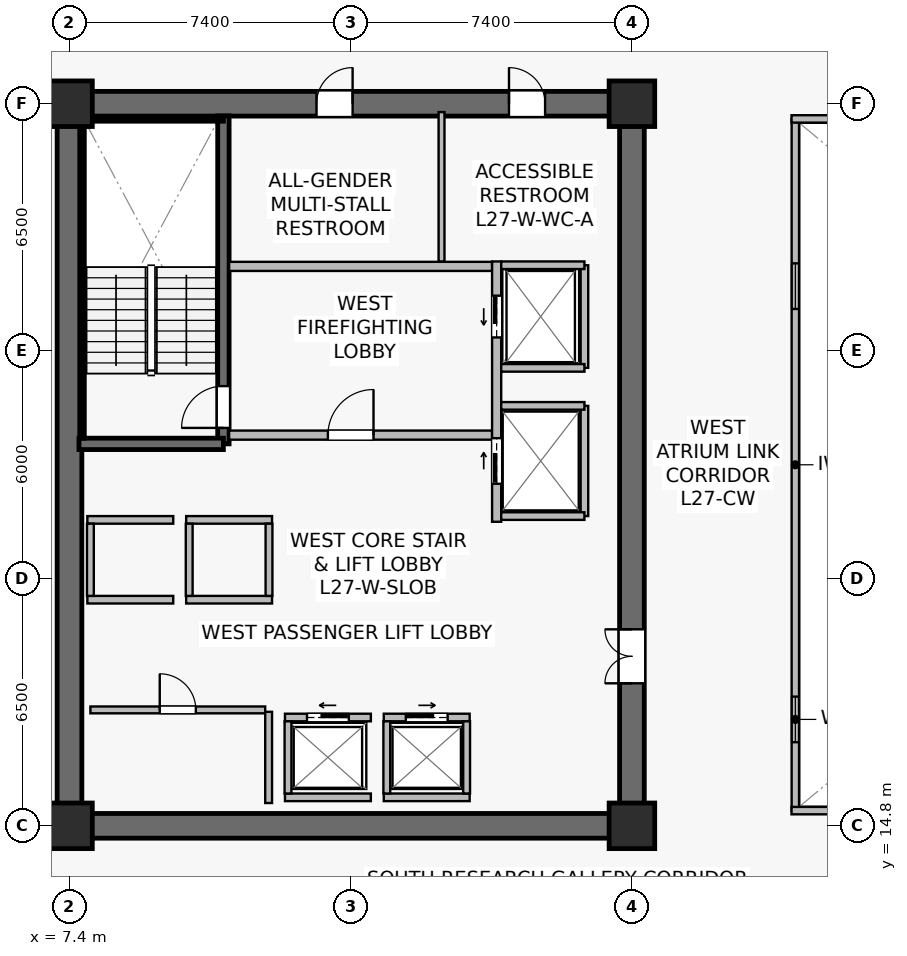
"""IFC4 building model, lengths in metres.
Left out: names, types, materials, properties, quantities, classifications, styles, units other than length and angle.
Written with IfcOpenShell. Run it as: python <this file> out.ifc"""

import sys

from ifc_helpers import new_model, si_unit, direction, frame, frame_2d, origin, origin_2d, place, context, subcontext, project, spatial, rectangle, extrude, source, transform, mapped, element, fill, save


model = new_model("IFC4")
c1 = context("Model", 3, precision=1e-05, world=origin(), true_north=direction((0.0, 1.0)))
c2 = subcontext(c1, "Body", "Model", "MODEL_VIEW")
j1 = project(units=[si_unit("LENGTHUNIT", "METRE"), si_unit("PLANEANGLEUNIT", "RADIAN")], contexts=[c1])
p1 = place(None, origin())
s1 = spatial("IfcSite", under=j1, at=p1, CompositionType="ELEMENT")
p2 = place(p1, origin())
s2 = spatial("IfcBuilding", under=s1, at=p2, CompositionType="ELEMENT")
p3 = place(p2, frame((0.0, 0.0, 113.3)))
s3 = spatial("IfcBuildingStorey", under=s2, at=p3, CompositionType="ELEMENT", Elevation=113.3)
p4 = place(p3, frame((7.075, 14.8, 0.0), z_axis=(0.0, 0.0, 1.0), x_axis=(1.0, 0.0, 0.0)))
e1 = element("IfcWall", 1, at=p4, inside=s3, PredefinedType="SHEAR", context=c2, shape_type="SweptSolid", body=[
    extrude(rectangle(XDim=15.45, YDim=0.65, at=frame_2d((7.725, 0.0))), origin(), (0.0, 0.0, 1.0), 3.79),
])
p5 = place(p3, frame((7.075, 33.8, 0.0), z_axis=(0.0, 0.0, 1.0), x_axis=(1.0, 0.0, 0.0)))
e2 = element("IfcWall", 2, at=p5, inside=s3, PredefinedType="SHEAR", context=c2, shape_type="SweptSolid", body=[
    extrude(rectangle(XDim=15.45, YDim=0.65, at=frame_2d((7.725, 0.0))), origin(), (0.0, 0.0, 1.0), 3.79),
])
p6 = place(p5, frame((6.825, 0.0, 0.0)))
e3 = element("IfcOpeningElement", 3, at=p6, cuts=e2, PredefinedType="OPENING", context=c2, shape_type="SweptSolid", body=[
    extrude(rectangle(XDim=0.95, YDim=2.15, at=frame_2d((0.475, 1.075))), frame((0.0, 0.335, 0.0), z_axis=(0.0, -1.0, 0.0), x_axis=(1.0, 0.0, 0.0)), (0.0, 0.0, 1.0), 0.67),
])
p7 = place(p5, frame((11.89, 0.0, 0.0)))
e4 = element("IfcOpeningElement", 4, at=p7, cuts=e2, PredefinedType="OPENING", context=c2, shape_type="SweptSolid", body=[
    extrude(rectangle(XDim=0.95, YDim=2.15, at=frame_2d((0.475, 1.075))), frame((0.0, 0.335, 0.0), z_axis=(0.0, -1.0, 0.0), x_axis=(1.0, 0.0, 0.0)), (0.0, 0.0, 1.0), 0.67),
])
p8 = place(p3, frame((7.4, 15.125, 0.0), z_axis=(0.0, 0.0, 1.0), x_axis=(0.0, 1.0, 0.0)))
e5 = element("IfcWall", 5, at=p8, inside=s3, PredefinedType="SHEAR", context=c2, shape_type="SweptSolid", body=[
    extrude(rectangle(XDim=18.35, YDim=0.65, at=frame_2d((9.175, 0.0))), origin(), (0.0, 0.0, 1.0), 3.79),
])
p9 = place(p3, frame((22.2, 15.125, 0.0), z_axis=(0.0, 0.0, 1.0), x_axis=(0.0, 1.0, 0.0)))
e6 = element("IfcWall", 6, at=p9, inside=s3, PredefinedType="SHEAR", context=c2, shape_type="SweptSolid", body=[
    extrude(rectangle(XDim=18.35, YDim=0.65, at=frame_2d((9.175, 0.0))), origin(), (0.0, 0.0, 1.0), 3.79),
])
p10 = place(p9, frame((3.425, 0.0, 0.0)))
e7 = element("IfcOpeningElement", 7, at=p10, cuts=e6, PredefinedType="OPENING", context=c2, shape_type="SweptSolid", body=[
    extrude(rectangle(XDim=1.42, YDim=2.2, at=frame_2d((0.71, 1.1))), frame((0.0, 0.335, 0.0), z_axis=(0.0, -1.0, 0.0), x_axis=(1.0, 0.0, 0.0)), (0.0, 0.0, 1.0), 0.67),
])
p11 = place(p3, frame((11.45, 24.85, 0.0), z_axis=(0.0, 0.0, 1.0), x_axis=(0.0, 1.0, 0.0)))
e8 = element("IfcWall", 8, at=p11, inside=s3, PredefinedType="SHEAR", context=c2, shape_type="SweptSolid", body=[
    extrude(rectangle(XDim=8.63, YDim=0.3, at=frame_2d((4.315, 0.0))), origin(), (0.0, 0.0, 1.0), 3.79),
])
p12 = place(p11, frame((0.42, 0.0, 0.0)))
e9 = element("IfcOpeningElement", 9, at=p12, cuts=e8, PredefinedType="OPENING", context=c2, shape_type="SweptSolid", body=[
    extrude(rectangle(XDim=1.1, YDim=2.15, at=frame_2d((0.55, 1.075))), frame((0.0, 0.16, 0.0), z_axis=(0.0, -1.0, 0.0), x_axis=(1.0, 0.0, 0.0)), (0.0, 0.0, 1.0), 0.32),
])
p13 = place(p3, frame((7.65, 24.85, 0.0), z_axis=(0.0, 0.0, 1.0), x_axis=(1.0, 0.0, 0.0)))
e10 = element("IfcWall", 10, at=p13, inside=s3, PredefinedType="SHEAR", context=c2, shape_type="SweptSolid", body=[
    extrude(rectangle(XDim=3.8, YDim=0.3, at=frame_2d((1.9, 0.0))), origin(), (0.0, 0.0, 1.0), 3.79),
])
p14 = place(p3, frame((7.73, 33.4, 0.0), z_axis=(0.0, 0.0, 1.0), x_axis=(1.0, 0.0, 0.0)))
e11 = element("IfcWall", 11, at=p14, inside=s3, PredefinedType="SOLIDWALL", context=c2, shape_type="SweptSolid", body=[
    extrude(rectangle(XDim=3.72, YDim=0.12, at=frame_2d((1.86, 0.0))), origin(), (0.0, 0.0, 1.0), 3.79),
])
p15 = place(p3, frame((7.73, 25.0, 0.0), z_axis=(0.0, 0.0, 1.0), x_axis=(0.0, 1.0, 0.0)))
e12 = element("IfcWall", 12, at=p15, inside=s3, PredefinedType="SOLIDWALL", context=c2, shape_type="SweptSolid", body=[
    extrude(rectangle(XDim=8.32, YDim=0.12, at=frame_2d((4.16, 0.0))), origin(), (0.0, 0.0, 1.0), 3.79),
])
m1 = source(origin(), c2, "Body", "SweptSolid", [
    extrude(rectangle(XDim=1.2, YDim=1.2, at=origin_2d()), origin(), (0.0, 0.0, 1.0), 4.1),
])
for number, where, z_axis, x_axis in (
    (13, (7.4, 14.8, 0.0), (0.0, 0.0, 1.0), (1.0, 0.0, 0.0)),
    (14, (22.2, 14.8, 0.0), (0.0, 0.0, 1.0), (1.0, 0.0, 0.0)),
    (15, (7.4, 33.8, 0.0), (0.0, 0.0, 1.0), (1.0, 0.0, 0.0)),
    (16, (22.2, 33.8, 0.0), (0.0, 0.0, 1.0), (1.0, 0.0, 0.0)),
):
    element("IfcColumn", number, at=place(p3, frame(where, z_axis=z_axis, x_axis=x_axis)), inside=s3, PredefinedType="COLUMN", context=c2, shape_type="MappedRepresentation", body=[
        mapped(m1, transform((0.0, 0.0, 0.0), scale=1.0)),
    ])
p16 = place(p3, frame((11.6, 25.08, 0.0), z_axis=(0.0, 0.0, 1.0), x_axis=(1.0, 0.0, 0.0)))
e17 = element("IfcWall", 17, at=p16, inside=s3, PredefinedType="SOLIDWALL", context=c2, shape_type="SweptSolid", body=[
    extrude(rectangle(XDim=6.92, YDim=0.24, at=frame_2d((3.46, 0.0))), origin(), (0.0, 0.0, 1.0), 3.125),
])
p17 = place(p16, frame((2.6, 0.0, 0.0)))
e18 = element("IfcOpeningElement", 18, at=p17, cuts=e17, PredefinedType="OPENING", context=c2, shape_type="SweptSolid", body=[
    extrude(rectangle(XDim=1.2, YDim=2.16, at=frame_2d((0.6, 1.08))), frame((0.0, 0.13, 0.0), z_axis=(0.0, -1.0, 0.0), x_axis=(1.0, 0.0, 0.0)), (0.0, 0.0, 1.0), 0.26),
])
p18 = place(p3, frame((11.6, 29.52, 0.0), z_axis=(0.0, 0.0, 1.0), x_axis=(1.0, 0.0, 0.0)))
e19 = element("IfcWall", 19, at=p18, inside=s3, PredefinedType="SOLIDWALL", context=c2, shape_type="SweptSolid", body=[
    extrude(rectangle(XDim=6.92, YDim=0.24, at=frame_2d((3.46, 0.0))), origin(), (0.0, 0.0, 1.0), 3.125),
])
p19 = place(p3, frame((18.64, 22.8, 0.0), z_axis=(0.0, 0.0, 1.0), x_axis=(0.0, 1.0, 0.0)))
e20 = element("IfcWall", 20, at=p19, inside=s3, PredefinedType="SOLIDWALL", context=c2, shape_type="SweptSolid", body=[
    extrude(rectangle(XDim=6.85, YDim=0.24, at=frame_2d((3.425, 0.0))), origin(), (0.0, 0.0, 1.0), 2.875),
])
p20 = place(p19, frame((4.85, 0.0, 0.0)))
e21 = element("IfcOpeningElement", 21, at=p20, cuts=e20, PredefinedType="OPENING", context=c2, shape_type="SweptSolid", body=[
    extrude(rectangle(XDim=1.1, YDim=2.22, at=frame_2d((0.55, 1.11))), frame((0.0, 0.13, 0.0), z_axis=(0.0, -1.0, 0.0), x_axis=(1.0, 0.0, 0.0)), (0.0, 0.0, 1.0), 0.26),
])
p21 = place(p19, frame((1.0, 0.0, 0.0)))
e22 = element("IfcOpeningElement", 22, at=p21, cuts=e20, PredefinedType="OPENING", context=c2, shape_type="SweptSolid", body=[
    extrude(rectangle(XDim=1.2, YDim=2.22, at=frame_2d((0.6, 1.11))), frame((0.0, 0.13, 0.0), z_axis=(0.0, -1.0, 0.0), x_axis=(1.0, 0.0, 0.0)), (0.0, 0.0, 1.0), 0.26),
])
p22 = place(p3, frame((13.07, 17.65, 0.0), z_axis=(0.0, 0.0, 1.0), x_axis=(1.0, 0.0, 0.0)))
e23 = element("IfcWall", 23, at=p22, inside=s3, PredefinedType="SOLIDWALL", context=c2, shape_type="SweptSolid", body=[
    extrude(rectangle(XDim=2.26, YDim=0.2, at=frame_2d((1.13, 0.0))), origin(), (0.0, 0.0, 1.0), 3.125),
])
p23 = place(p22, frame((0.58, 0.0, 0.0)))
e24 = element("IfcOpeningElement", 24, at=p23, cuts=e23, PredefinedType="OPENING", context=c2, shape_type="SweptSolid", body=[
    extrude(rectangle(XDim=1.1, YDim=2.22, at=frame_2d((0.55, 1.11))), frame((0.0, 0.11, 0.0), z_axis=(0.0, -1.0, 0.0), x_axis=(1.0, 0.0, 0.0)), (0.0, 0.0, 1.0), 0.22),
])
p24 = place(p3, frame((13.07, 15.55, 0.0), z_axis=(0.0, 0.0, 1.0), x_axis=(1.0, 0.0, 0.0)))
e25 = element("IfcWall", 25, at=p24, inside=s3, PredefinedType="SOLIDWALL", context=c2, shape_type="SweptSolid", body=[
    extrude(rectangle(XDim=2.26, YDim=0.2, at=frame_2d((1.13, 0.0))), origin(), (0.0, 0.0, 1.0), 3.125),
])
p25 = place(p3, frame((13.15, 15.65, 0.0), z_axis=(0.0, 0.0, 1.0), x_axis=(0.0, 1.0, 0.0)))
e26 = element("IfcWall", 26, at=p25, inside=s3, PredefinedType="SOLIDWALL", context=c2, shape_type="SweptSolid", body=[
    extrude(rectangle(XDim=1.9, YDim=0.18, at=frame_2d((0.95, 0.0))), origin(), (0.0, 0.0, 1.0), 3.79),
])
p26 = place(p3, frame((15.67, 17.65, 0.0), z_axis=(0.0, 0.0, 1.0), x_axis=(1.0, 0.0, 0.0)))
e27 = element("IfcWall", 27, at=p26, inside=s3, PredefinedType="SOLIDWALL", context=c2, shape_type="SweptSolid", body=[
    extrude(rectangle(XDim=2.26, YDim=0.2, at=frame_2d((1.13, 0.0))), origin(), (0.0, 0.0, 1.0), 3.79),
])
p27 = place(p26, frame((0.58, 0.0, 0.0)))
e28 = element("IfcOpeningElement", 28, at=p27, cuts=e27, PredefinedType="OPENING", context=c2, shape_type="SweptSolid", body=[
    extrude(rectangle(XDim=1.1, YDim=2.22, at=frame_2d((0.55, 1.11))), frame((0.0, 0.11, 0.0), z_axis=(0.0, -1.0, 0.0), x_axis=(1.0, 0.0, 0.0)), (0.0, 0.0, 1.0), 0.22),
])
p28 = place(p3, frame((15.67, 15.55, 0.0), z_axis=(0.0, 0.0, 1.0), x_axis=(1.0, 0.0, 0.0)))
e29 = element("IfcWall", 29, at=p28, inside=s3, PredefinedType="SOLIDWALL", context=c2, shape_type="SweptSolid", body=[
    extrude(rectangle(XDim=2.26, YDim=0.2, at=frame_2d((1.13, 0.0))), origin(), (0.0, 0.0, 1.0), 3.79),
])
for number, where, z_axis, x_axis in (
    (30, (15.75, 15.65, 0.0), (0.0, 0.0, 1.0), (0.0, 1.0, 0.0)),
    (31, (17.85, 15.65, 0.0), (0.0, 0.0, 1.0), (0.0, 1.0, 0.0)),
):
    element("IfcWall", number, at=place(p3, frame(where, z_axis=z_axis, x_axis=x_axis)), inside=s3, PredefinedType="SOLIDWALL", context=c2, shape_type="SweptSolid", body=[
        extrude(rectangle(XDim=1.9, YDim=0.18, at=frame_2d((0.95, 0.0))), origin(), (0.0, 0.0, 1.0), 3.79),
    ])
for number, where, z_axis, x_axis in (
    (32, (7.87, 20.75, 0.0), (0.0, 0.0, 1.0), (1.0, 0.0, 0.0)),
    (33, (7.87, 22.85, 0.0), (0.0, 0.0, 1.0), (1.0, 0.0, 0.0)),
):
    element("IfcWall", number, at=place(p3, frame(where, z_axis=z_axis, x_axis=x_axis)), inside=s3, PredefinedType="SOLIDWALL", context=c2, shape_type="SweptSolid", body=[
        extrude(rectangle(XDim=2.26, YDim=0.2, at=frame_2d((1.13, 0.0))), origin(), (0.0, 0.0, 1.0), 3.79),
    ])
p29 = place(p3, frame((7.95, 20.85, 0.0), z_axis=(0.0, 0.0, 1.0), x_axis=(0.0, 1.0, 0.0)))
e34 = element("IfcWall", 34, at=p29, inside=s3, PredefinedType="SOLIDWALL", context=c2, shape_type="SweptSolid", body=[
    extrude(rectangle(XDim=1.9, YDim=0.18, at=frame_2d((0.95, 0.0))), origin(), (0.0, 0.0, 1.0), 3.79),
])
for number, where, z_axis, x_axis in (
    (35, (10.47, 20.75, 0.0), (0.0, 0.0, 1.0), (1.0, 0.0, 0.0)),
    (36, (10.47, 22.85, 0.0), (0.0, 0.0, 1.0), (1.0, 0.0, 0.0)),
):
    element("IfcWall", number, at=place(p3, frame(where, z_axis=z_axis, x_axis=x_axis)), inside=s3, PredefinedType="SOLIDWALL", context=c2, shape_type="SweptSolid", body=[
        extrude(rectangle(XDim=2.26, YDim=0.2, at=frame_2d((1.13, 0.0))), origin(), (0.0, 0.0, 1.0), 3.79),
    ])
for number, where, z_axis, x_axis in (
    (37, (10.55, 20.85, 0.0), (0.0, 0.0, 1.0), (0.0, 1.0, 0.0)),
    (38, (12.65, 20.85, 0.0), (0.0, 0.0, 1.0), (0.0, 1.0, 0.0)),
):
    element("IfcWall", number, at=place(p3, frame(where, z_axis=z_axis, x_axis=x_axis)), inside=s3, PredefinedType="SOLIDWALL", context=c2, shape_type="SweptSolid", body=[
        extrude(rectangle(XDim=1.9, YDim=0.18, at=frame_2d((0.95, 0.0))), origin(), (0.0, 0.0, 1.0), 3.79),
    ])
p30 = place(p3, frame((20.95, 26.85, 0.0), z_axis=(0.0, 0.0, 1.0), x_axis=(0.0, 1.0, 0.0)))
e39 = element("IfcWall", 39, at=p30, inside=s3, PredefinedType="SOLIDWALL", context=c2, shape_type="SweptSolid", body=[
    extrude(rectangle(XDim=2.7, YDim=0.2, at=frame_2d((1.35, 0.0))), origin(), (0.0, 0.0, 1.0), 3.79),
])
p31 = place(p3, frame((18.76, 29.55, 0.0), z_axis=(0.0, 0.0, 1.0), x_axis=(1.0, 0.0, 0.0)))
e40 = element("IfcWall", 40, at=p31, inside=s3, PredefinedType="SOLIDWALL", context=c2, shape_type="SweptSolid", body=[
    extrude(rectangle(XDim=2.19, YDim=0.2, at=frame_2d((1.095, 0.0))), origin(), (0.0, 0.0, 1.0), 3.79),
])
p32 = place(p3, frame((18.76, 26.85, 0.0), z_axis=(0.0, 0.0, 1.0), x_axis=(1.0, 0.0, 0.0)))
e41 = element("IfcWall", 41, at=p32, inside=s3, PredefinedType="SOLIDWALL", context=c2, shape_type="SweptSolid", body=[
    extrude(rectangle(XDim=2.19, YDim=0.2, at=frame_2d((1.095, 0.0))), origin(), (0.0, 0.0, 1.0), 3.187),
])
p33 = place(p3, frame((20.95, 22.95, 0.0), z_axis=(0.0, 0.0, 1.0), x_axis=(0.0, 1.0, 0.0)))
e42 = element("IfcWall", 42, at=p33, inside=s3, PredefinedType="SOLIDWALL", context=c2, shape_type="SweptSolid", body=[
    extrude(rectangle(XDim=2.9, YDim=0.2, at=frame_2d((1.45, 0.0))), origin(), (0.0, 0.0, 1.0), 2.875),
])
for number, where, z_axis, x_axis in (
    (43, (18.76, 25.85, 0.0), (0.0, 0.0, 1.0), (1.0, 0.0, 0.0)),
    (44, (18.76, 22.95, 0.0), (0.0, 0.0, 1.0), (1.0, 0.0, 0.0)),
):
    element("IfcWall", number, at=place(p3, frame(where, z_axis=z_axis, x_axis=x_axis)), inside=s3, PredefinedType="SOLIDWALL", context=c2, shape_type="SweptSolid", body=[
        extrude(rectangle(XDim=2.19, YDim=0.2, at=frame_2d((1.095, 0.0))), origin(), (0.0, 0.0, 1.0), 3.79),
    ])
p34 = place(p3, frame((7.95, 17.85, 0.0), z_axis=(0.0, 0.0, 1.0), x_axis=(1.0, 0.0, 0.0)))
e45 = element("IfcWall", 45, at=p34, inside=s3, PredefinedType="SOLIDWALL", context=c2, shape_type="SweptSolid", body=[
    extrude(rectangle(XDim=4.6, YDim=0.18, at=frame_2d((2.3, 0.0))), origin(), (0.0, 0.0, 1.0), 3.79),
])
p35 = place(p34, frame((1.825, 0.0, 0.0)))
e46 = element("IfcOpeningElement", 46, at=p35, cuts=e45, PredefinedType="OPENING", context=c2, shape_type="SweptSolid", body=[
    extrude(rectangle(XDim=0.95, YDim=2.15, at=frame_2d((0.475, 1.075))), frame((0.0, 0.1, 0.0), z_axis=(0.0, -1.0, 0.0), x_axis=(1.0, 0.0, 0.0)), (0.0, 0.0, 1.0), 0.2),
])
p36 = place(p3, frame((12.64, 15.4, 0.0), z_axis=(0.0, 0.0, 1.0), x_axis=(0.0, 1.0, 0.0)))
e47 = element("IfcWall", 47, at=p36, inside=s3, PredefinedType="SOLIDWALL", context=c2, shape_type="SweptSolid", body=[
    extrude(rectangle(XDim=2.4, YDim=0.18, at=frame_2d((1.2, 0.0))), origin(), (0.0, 0.0, 1.0), 3.79),
])
p37 = place(p3, frame((17.19, 29.65, 0.0), z_axis=(0.0, 0.0, 1.0), x_axis=(0.0, 1.0, 0.0)))
e48 = element("IfcWall", 48, at=p37, inside=s3, PredefinedType="PLUMBINGWALL", context=c2, shape_type="SweptSolid", body=[
    extrude(rectangle(XDim=3.93, YDim=0.155, at=frame_2d((1.965, 0.0))), origin(), (0.0, 0.0, 1.0), 3.79),
])
p38 = place(p3, frame((26.5, 15.2, 0.0), z_axis=(0.0, 0.0, 1.0), x_axis=(0.0, 1.0, 0.0)))
e49 = element("IfcWall", 49, at=p38, inside=s3, PredefinedType="SOLIDWALL", context=c2, shape_type="SweptSolid", body=[
    extrude(rectangle(XDim=18.2, YDim=0.195, at=frame_2d((9.1, 0.0))), origin(), (0.0, 0.0, 1.0), 3.79),
])
p39 = place(p38, frame((1.8, 0.0, 0.9)))
e50 = element("IfcOpeningElement", 50, at=p39, cuts=e49, PredefinedType="OPENING", context=c2, shape_type="SweptSolid", body=[
    extrude(rectangle(XDim=1.2, YDim=1.35, at=frame_2d((0.6, 0.675))), frame((0.0, 0.107, 0.0), z_axis=(0.0, -1.0, 0.0), x_axis=(1.0, 0.0, 0.0)), (0.0, 0.0, 1.0), 0.215),
])
p40 = place(p38, frame((13.2, 0.0, 0.9)))
e51 = element("IfcOpeningElement", 51, at=p40, cuts=e49, PredefinedType="OPENING", context=c2, shape_type="SweptSolid", body=[
    extrude(rectangle(XDim=1.2, YDim=1.35, at=frame_2d((0.6, 0.675))), frame((0.0, 0.107, 0.0), z_axis=(0.0, -1.0, 0.0), x_axis=(1.0, 0.0, 0.0)), (0.0, 0.0, 1.0), 0.215),
])
for number, where, z_axis, x_axis in (
    (52, (26.4, 15.2, 0.0), (0.0, 0.0, 1.0), (1.0, 0.0, 0.0)),
    (53, (26.4, 33.4, 0.0), (0.0, 0.0, 1.0), (1.0, 0.0, 0.0)),
):
    element("IfcWall", number, at=place(p3, frame(where, z_axis=z_axis, x_axis=x_axis)), inside=s3, PredefinedType="SOLIDWALL", context=c2, shape_type="SweptSolid", body=[
        extrude(rectangle(XDim=22.0, YDim=0.195, at=frame_2d((11.0, 0.0))), origin(), (0.0, 0.0, 1.0), 3.79),
    ])
m2 = source(origin(), c2, "Body", "SweptSolid", [
    extrude(rectangle(XDim=1.2, YDim=1.35, at=frame_2d((0.6, 0.675))), frame((0.0, 0.03, 0.0), z_axis=(0.0, -1.0, 0.0), x_axis=(1.0, 0.0, 0.0)), (0.0, 0.0, 1.0), 0.06),
])
p41 = place(p39, origin())
e54 = element("IfcWindow", 54, at=p41, inside=s3, PartitioningType="SINGLE_PANEL", PredefinedType="WINDOW", context=c2, shape_type="MappedRepresentation", body=[
    mapped(m2, transform((0.0, 0.0, 0.0), scale=1.0)),
])
fill(e50, e54)
p42 = place(p40, origin())
e55 = element("IfcWindow", 55, at=p42, inside=s3, PartitioningType="SINGLE_PANEL", PredefinedType="WINDOW", context=c2, shape_type="MappedRepresentation", body=[
    mapped(m2, transform((0.0, 0.0, 0.0), scale=1.0)),
])
fill(e51, e55)
m3 = source(origin(), c2, "Body", "SweptSolid", [
    extrude(rectangle(XDim=1.1, YDim=2.15, at=frame_2d((0.55, 1.075))), frame((0.0, 0.025, 0.0), z_axis=(0.0, -1.0, 0.0), x_axis=(1.0, 0.0, 0.0)), (0.0, 0.0, 1.0), 0.05),
])
p43 = place(p12, origin())
e56 = element("IfcDoor", 56, at=p43, inside=s3, OperationType="SINGLE_SWING_LEFT", PredefinedType="DOOR", context=c2, shape_type="MappedRepresentation", body=[
    mapped(m3, transform((0.0, 0.0, 0.0), scale=1.0)),
])
fill(e9, e56)
m4 = source(origin(), c2, "Body", "SweptSolid", [
    extrude(rectangle(XDim=1.2, YDim=2.16, at=frame_2d((0.6, 1.08))), frame((0.0, 0.025, 0.0), z_axis=(0.0, -1.0, 0.0), x_axis=(1.0, 0.0, 0.0)), (0.0, 0.0, 1.0), 0.05),
])
p44 = place(p17, origin())
e57 = element("IfcDoor", 57, at=p44, inside=s3, OperationType="SINGLE_SWING_RIGHT", PredefinedType="DOOR", context=c2, shape_type="MappedRepresentation", body=[
    mapped(m4, transform((0.0, 0.0, 0.0), scale=1.0)),
])
fill(e18, e57)
m5 = source(origin(), c2, "Body", "SweptSolid", [
    extrude(rectangle(XDim=1.1, YDim=2.22, at=frame_2d((0.55, 1.11))), frame((0.0, 0.025, 0.0), z_axis=(0.0, -1.0, 0.0), x_axis=(1.0, 0.0, 0.0)), (0.0, 0.0, 1.0), 0.05),
])
p45 = place(p23, origin())
e58 = element("IfcDoor", 58, at=p45, inside=s3, OperationType="SLIDING_TO_LEFT", PredefinedType="USERDEFINED", context=c2, shape_type="MappedRepresentation", body=[
    mapped(m5, transform((0.0, 0.0, 0.0), scale=1.0)),
])
fill(e24, e58)
p46 = place(p27, origin())
e59 = element("IfcDoor", 59, at=p46, inside=s3, OperationType="SLIDING_TO_RIGHT", PredefinedType="USERDEFINED", context=c2, shape_type="MappedRepresentation", body=[
    mapped(m5, transform((0.0, 0.0, 0.0), scale=1.0)),
])
fill(e28, e59)
p47 = place(p20, origin())
e60 = element("IfcDoor", 60, at=p47, inside=s3, OperationType="SLIDING_TO_LEFT", PredefinedType="USERDEFINED", context=c2, shape_type="MappedRepresentation", body=[
    mapped(m5, transform((0.0, 0.0, 0.0), scale=1.0)),
])
fill(e21, e60)
m6 = source(origin(), c2, "Body", "SweptSolid", [
    extrude(rectangle(XDim=1.2, YDim=2.22, at=frame_2d((0.6, 1.11))), frame((0.0, 0.025, 0.0), z_axis=(0.0, -1.0, 0.0), x_axis=(1.0, 0.0, 0.0)), (0.0, 0.0, 1.0), 0.05),
])
p48 = place(p21, origin())
e61 = element("IfcDoor", 61, at=p48, inside=s3, OperationType="SLIDING_TO_RIGHT", PredefinedType="USERDEFINED", context=c2, shape_type="MappedRepresentation", body=[
    mapped(m6, transform((0.0, 0.0, 0.0), scale=1.0)),
])
fill(e22, e61)
m7 = source(origin(), c2, "Body", "SweptSolid", [
    extrude(rectangle(XDim=0.95, YDim=2.15, at=frame_2d((0.475, 1.075))), frame((0.0, 0.025, 0.0), z_axis=(0.0, -1.0, 0.0), x_axis=(1.0, 0.0, 0.0)), (0.0, 0.0, 1.0), 0.05),
])
p49 = place(p35, origin())
e62 = element("IfcDoor", 62, at=p49, inside=s3, OperationType="SINGLE_SWING_LEFT", PredefinedType="DOOR", context=c2, shape_type="MappedRepresentation", body=[
    mapped(m7, transform((0.0, 0.0, 0.0), scale=1.0)),
])
fill(e46, e62)
m8 = source(origin(), c2, "Body", "SweptSolid", [
    extrude(rectangle(XDim=1.42, YDim=2.2, at=frame_2d((0.71, 1.1))), frame((0.0, 0.025, 0.0), z_axis=(0.0, -1.0, 0.0), x_axis=(1.0, 0.0, 0.0)), (0.0, 0.0, 1.0), 0.05),
])
p50 = place(p10, origin())
e63 = element("IfcDoor", 63, at=p50, inside=s3, OperationType="DOUBLE_DOOR_SINGLE_SWING", PredefinedType="DOOR", context=c2, shape_type="MappedRepresentation", body=[
    mapped(m8, transform((0.0, 0.0, 0.0), scale=1.0)),
])
fill(e7, e63)
p51 = place(p6, origin())
e64 = element("IfcDoor", 64, at=p51, inside=s3, OperationType="SINGLE_SWING_RIGHT", PredefinedType="DOOR", context=c2, shape_type="MappedRepresentation", body=[
    mapped(m7, transform((0.0, 0.0, 0.0), scale=1.0)),
])
fill(e3, e64)
p52 = place(p7, origin())
e65 = element("IfcDoor", 65, at=p52, inside=s3, OperationType="SINGLE_SWING_LEFT", PredefinedType="DOOR", context=c2, shape_type="MappedRepresentation", body=[
    mapped(m7, transform((0.0, 0.0, 0.0), scale=1.0)),
])
fill(e4, e65)
save(model, sys.argv[1])
